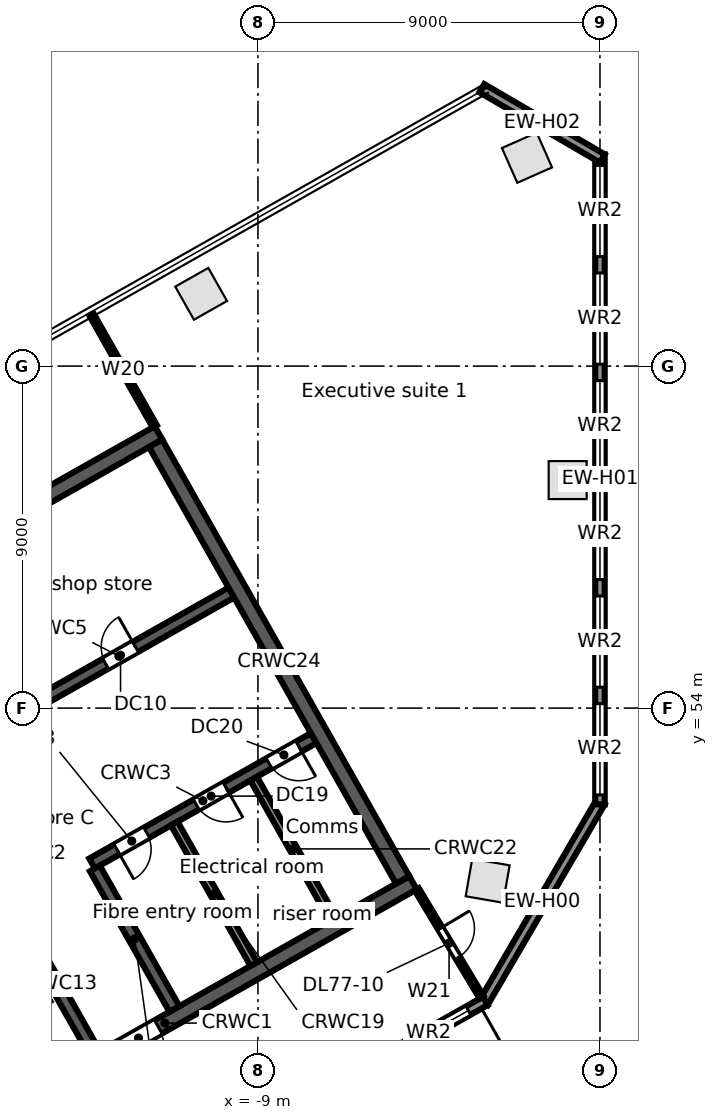
"""IFC4 building model, lengths in metres.
Left out: names, types, materials, properties, quantities, classifications, styles, units other than length and angle.
Written with IfcOpenShell. Run it as: python <this file> out.ifc"""

import sys

from ifc_helpers import new_model, si_unit, direction, frame, frame_2d, origin, origin_2d, place, context, subcontext, project, spatial, rectangle, extrude, element, fill, save


model = new_model("IFC4")
c1 = context("Model", 3, precision=1e-05, world=origin(), true_north=direction((0.0, 1.0)))
c2 = subcontext(c1, "Body", "Model", "MODEL_VIEW")
j1 = project(units=[si_unit("LENGTHUNIT", "METRE"), si_unit("PLANEANGLEUNIT", "RADIAN")], contexts=[c1])
p1 = place(None, origin())
s1 = spatial("IfcSite", under=j1, at=p1, CompositionType="ELEMENT")
p2 = place(p1, origin())
s2 = spatial("IfcBuilding", under=s1, at=p2, CompositionType="ELEMENT")
p3 = place(p2, frame((0.0, 0.0, 339.3)))
s3 = spatial("IfcBuildingStorey", under=s2, at=p3, CompositionType="ELEMENT", Elevation=339.3)
for number, where, z_axis, x_axis in (
    (1, (-10.495, 64.902, 0.0), (0.0, 0.0, 1.0), (-0.87, -0.492, 0.0)),
    (2, (-2.955, 49.456, 0.0), (0.0, 0.0, 1.0), (-0.985, 0.171, 0.0)),
    (3, (-0.85, 60.0, 0.0), (0.0, 0.0, 1.0), (0.0, 1.0, 0.0)),
    (4, (-1.92, 68.483, 0.0), (0.0, 0.0, 1.0), (-0.915, -0.404, 0.0)),
):
    element("IfcColumn", number, at=place(p3, frame(where, z_axis=z_axis, x_axis=x_axis)), inside=s3, PredefinedType="COLUMN", context=c2, shape_type="SweptSolid", body=[
        extrude(rectangle(XDim=1.0, YDim=1.0, at=origin_2d()), origin(), (0.0, 0.0, 1.0), 3.8),
    ])
p4 = place(p3, frame((0.017, 51.529, 0.0), z_axis=(0.0, 0.0, 1.0), x_axis=(-0.503769237131, -0.863838269424, 0.0)))
e5 = element("IfcWall", 5, at=p4, inside=s3, PredefinedType="STANDARD", context=c2, shape_type="SweptSolid", body=[
    extrude(rectangle(XDim=6.115, YDim=0.25, at=frame_2d((3.057, 0.0))), origin(), (0.0, 0.0, 1.0), 3.52),
])
p5 = place(p3, frame((0.0, 68.572, 0.0), z_axis=(0.0, 0.0, 1.0), x_axis=(0.0, -1.0, 0.0)))
e6 = element("IfcWall", 6, at=p5, inside=s3, PredefinedType="STANDARD", context=c2, shape_type="SweptSolid", body=[
    extrude(rectangle(XDim=17.105, YDim=0.25, at=frame_2d((8.553, 0.0))), origin(), (0.0, 0.0, 1.0), 3.52),
])
p6 = place(p5, frame((14.455, 0.0, 0.8)))
e7 = element("IfcOpeningElement", 7, at=p6, cuts=e6, PredefinedType="OPENING", context=c2, shape_type="SweptSolid", body=[
    extrude(rectangle(XDim=2.4, YDim=2.2, at=frame_2d((1.2, 1.1))), frame((0.0, 0.135, 0.0), z_axis=(0.0, -1.0, 0.0), x_axis=(1.0, 0.0, 0.0)), (0.0, 0.0, 1.0), 0.27),
])
p7 = place(p5, frame((11.622, 0.0, 0.8)))
e8 = element("IfcOpeningElement", 8, at=p7, cuts=e6, PredefinedType="OPENING", context=c2, shape_type="SweptSolid", body=[
    extrude(rectangle(XDim=2.4, YDim=2.2, at=frame_2d((1.2, 1.1))), frame((0.0, 0.135, 0.0), z_axis=(0.0, -1.0, 0.0), x_axis=(1.0, 0.0, 0.0)), (0.0, 0.0, 1.0), 0.27),
])
p8 = place(p5, frame((8.789, 0.0, 0.8)))
e9 = element("IfcOpeningElement", 9, at=p8, cuts=e6, PredefinedType="OPENING", context=c2, shape_type="SweptSolid", body=[
    extrude(rectangle(XDim=2.4, YDim=2.2, at=frame_2d((1.2, 1.1))), frame((0.0, 0.135, 0.0), z_axis=(0.0, -1.0, 0.0), x_axis=(1.0, 0.0, 0.0)), (0.0, 0.0, 1.0), 0.27),
])
p9 = place(p5, frame((5.955, 0.0, 0.8)))
e10 = element("IfcOpeningElement", 10, at=p9, cuts=e6, PredefinedType="OPENING", context=c2, shape_type="SweptSolid", body=[
    extrude(rectangle(XDim=2.4, YDim=2.2, at=frame_2d((1.2, 1.1))), frame((0.0, 0.135, 0.0), z_axis=(0.0, -1.0, 0.0), x_axis=(1.0, 0.0, 0.0)), (0.0, 0.0, 1.0), 0.27),
])
p10 = place(p5, frame((3.122, 0.0, 0.8)))
e11 = element("IfcOpeningElement", 11, at=p10, cuts=e6, PredefinedType="OPENING", context=c2, shape_type="SweptSolid", body=[
    extrude(rectangle(XDim=2.4, YDim=2.2, at=frame_2d((1.2, 1.1))), frame((0.0, 0.135, 0.0), z_axis=(0.0, -1.0, 0.0), x_axis=(1.0, 0.0, 0.0)), (0.0, 0.0, 1.0), 0.27),
])
p11 = place(p5, frame((0.289, 0.0, 0.8)))
e12 = element("IfcOpeningElement", 12, at=p11, cuts=e6, PredefinedType="OPENING", context=c2, shape_type="SweptSolid", body=[
    extrude(rectangle(XDim=2.4, YDim=2.2, at=frame_2d((1.2, 1.1))), frame((0.0, 0.135, 0.0), z_axis=(0.0, -1.0, 0.0), x_axis=(1.0, 0.0, 0.0)), (0.0, 0.0, 1.0), 0.27),
])
p12 = place(p3, frame((-3.108, 70.313, 0.0), z_axis=(0.0, 0.0, 1.0), x_axis=(0.86382474085, -0.503792434536, 0.0)))
e13 = element("IfcWall", 13, at=p12, inside=s3, PredefinedType="STANDARD", context=c2, shape_type="SweptSolid", body=[
    extrude(rectangle(XDim=3.67, YDim=0.25, at=frame_2d((1.835, 0.0))), origin(), (0.0, 0.0, 1.0), 3.52),
])
p13 = place(p3, frame((-3.017, 46.293, 0.0), z_axis=(0.0, 0.0, 1.0), x_axis=(-0.870355474887, -0.492423950812, 0.0)))
e14 = element("IfcWall", 14, at=p13, inside=s3, PredefinedType="STANDARD", context=c2, shape_type="SweptSolid", body=[
    extrude(rectangle(XDim=40.34, YDim=0.25, at=frame_2d((20.17, 0.0))), origin(), (0.0, 0.0, 1.0), 3.52),
])
p14 = place(p13, frame((37.428, 0.0, 0.8)))
e15 = element("IfcOpeningElement", 15, at=p14, cuts=e14, PredefinedType="OPENING", context=c2, shape_type="SweptSolid", body=[
    extrude(rectangle(XDim=2.4, YDim=2.2, at=frame_2d((1.2, 1.1))), frame((0.0, 0.135, 0.0), z_axis=(0.0, -1.0, 0.0), x_axis=(1.0, 0.0, 0.0)), (0.0, 0.0, 1.0), 0.27),
])
p15 = place(p13, frame((34.372, 0.0, 0.0)))
e16 = element("IfcOpeningElement", 16, at=p15, cuts=e14, PredefinedType="OPENING", context=c2, shape_type="SweptSolid", body=[
    extrude(rectangle(XDim=1.8, YDim=2.4, at=frame_2d((0.9, 1.2))), frame((0.0, 0.135, 0.0), z_axis=(0.0, -1.0, 0.0), x_axis=(1.0, 0.0, 0.0)), (0.0, 0.0, 1.0), 0.27),
])
p16 = place(p13, frame((30.716, 0.0, 0.8)))
e17 = element("IfcOpeningElement", 17, at=p16, cuts=e14, PredefinedType="OPENING", context=c2, shape_type="SweptSolid", body=[
    extrude(rectangle(XDim=2.4, YDim=2.2, at=frame_2d((1.2, 1.1))), frame((0.0, 0.135, 0.0), z_axis=(0.0, -1.0, 0.0), x_axis=(1.0, 0.0, 0.0)), (0.0, 0.0, 1.0), 0.27),
])
p17 = place(p13, frame((27.36, 0.0, 0.8)))
e18 = element("IfcOpeningElement", 18, at=p17, cuts=e14, PredefinedType="OPENING", context=c2, shape_type="SweptSolid", body=[
    extrude(rectangle(XDim=2.4, YDim=2.2, at=frame_2d((1.2, 1.1))), frame((0.0, 0.135, 0.0), z_axis=(0.0, -1.0, 0.0), x_axis=(1.0, 0.0, 0.0)), (0.0, 0.0, 1.0), 0.27),
])
p18 = place(p13, frame((24.304, 0.0, 0.0)))
e19 = element("IfcOpeningElement", 19, at=p18, cuts=e14, PredefinedType="OPENING", context=c2, shape_type="SweptSolid", body=[
    extrude(rectangle(XDim=1.8, YDim=2.4, at=frame_2d((0.9, 1.2))), frame((0.0, 0.135, 0.0), z_axis=(0.0, -1.0, 0.0), x_axis=(1.0, 0.0, 0.0)), (0.0, 0.0, 1.0), 0.27),
])
p19 = place(p13, frame((20.648, 0.0, 0.8)))
e20 = element("IfcOpeningElement", 20, at=p19, cuts=e14, PredefinedType="OPENING", context=c2, shape_type="SweptSolid", body=[
    extrude(rectangle(XDim=2.4, YDim=2.2, at=frame_2d((1.2, 1.1))), frame((0.0, 0.135, 0.0), z_axis=(0.0, -1.0, 0.0), x_axis=(1.0, 0.0, 0.0)), (0.0, 0.0, 1.0), 0.27),
])
p20 = place(p13, frame((17.292, 0.0, 0.8)))
e21 = element("IfcOpeningElement", 21, at=p20, cuts=e14, PredefinedType="OPENING", context=c2, shape_type="SweptSolid", body=[
    extrude(rectangle(XDim=2.4, YDim=2.2, at=frame_2d((1.2, 1.1))), frame((0.0, 0.135, 0.0), z_axis=(0.0, -1.0, 0.0), x_axis=(1.0, 0.0, 0.0)), (0.0, 0.0, 1.0), 0.27),
])
p21 = place(p13, frame((14.236, 0.0, 0.0)))
e22 = element("IfcOpeningElement", 22, at=p21, cuts=e14, PredefinedType="OPENING", context=c2, shape_type="SweptSolid", body=[
    extrude(rectangle(XDim=1.8, YDim=2.4, at=frame_2d((0.9, 1.2))), frame((0.0, 0.135, 0.0), z_axis=(0.0, -1.0, 0.0), x_axis=(1.0, 0.0, 0.0)), (0.0, 0.0, 1.0), 0.27),
])
p22 = place(p13, frame((10.58, 0.0, 0.8)))
e23 = element("IfcOpeningElement", 23, at=p22, cuts=e14, PredefinedType="OPENING", context=c2, shape_type="SweptSolid", body=[
    extrude(rectangle(XDim=2.4, YDim=2.2, at=frame_2d((1.2, 1.1))), frame((0.0, 0.135, 0.0), z_axis=(0.0, -1.0, 0.0), x_axis=(1.0, 0.0, 0.0)), (0.0, 0.0, 1.0), 0.27),
])
p23 = place(p13, frame((7.224, 0.0, 0.8)))
e24 = element("IfcOpeningElement", 24, at=p23, cuts=e14, PredefinedType="OPENING", context=c2, shape_type="SweptSolid", body=[
    extrude(rectangle(XDim=2.4, YDim=2.2, at=frame_2d((1.2, 1.1))), frame((0.0, 0.135, 0.0), z_axis=(0.0, -1.0, 0.0), x_axis=(1.0, 0.0, 0.0)), (0.0, 0.0, 1.0), 0.27),
])
p24 = place(p13, frame((4.168, 0.0, 0.0)))
e25 = element("IfcOpeningElement", 25, at=p24, cuts=e14, PredefinedType="OPENING", context=c2, shape_type="SweptSolid", body=[
    extrude(rectangle(XDim=1.8, YDim=2.4, at=frame_2d((0.9, 1.2))), frame((0.0, 0.135, 0.0), z_axis=(0.0, -1.0, 0.0), x_axis=(1.0, 0.0, 0.0)), (0.0, 0.0, 1.0), 0.27),
])
p25 = place(p13, frame((0.512, 0.0, 0.8)))
e26 = element("IfcOpeningElement", 26, at=p25, cuts=e14, PredefinedType="OPENING", context=c2, shape_type="SweptSolid", body=[
    extrude(rectangle(XDim=2.4, YDim=2.2, at=frame_2d((1.2, 1.1))), frame((0.0, 0.135, 0.0), z_axis=(0.0, -1.0, 0.0), x_axis=(1.0, 0.0, 0.0)), (0.0, 0.0, 1.0), 0.27),
])
p26 = place(p3, frame((-17.975, 42.017, 0.0), z_axis=(0.0, 0.0, 1.0), x_axis=(0.87034965173, 0.492434243055, 0.0)))
e27 = element("IfcWall", 27, at=p26, inside=s3, PredefinedType="SOLIDWALL", context=c2, shape_type="SweptSolid", body=[
    extrude(rectangle(XDim=15.0, YDim=0.4, at=frame_2d((7.5, 0.0))), origin(), (0.0, 0.0, 1.0), 3.52),
])
p27 = place(p26, frame((6.1, 0.0, 0.0)))
e28 = element("IfcOpeningElement", 28, at=p27, cuts=e27, PredefinedType="OPENING", context=c2, shape_type="SweptSolid", body=[
    extrude(rectangle(XDim=1.2, YDim=2.1, at=frame_2d((0.6, 1.05))), frame((0.0, 0.21, 0.0), z_axis=(0.0, -1.0, 0.0), x_axis=(1.0, 0.0, 0.0)), (0.0, 0.0, 1.0), 0.42),
])
p28 = place(p3, frame((-13.365, 49.911, 0.0), z_axis=(0.0, 0.0, 1.0), x_axis=(0.870347618718, 0.492437836272, 0.0)))
e29 = element("IfcWall", 29, at=p28, inside=s3, PredefinedType="SOLIDWALL", context=c2, shape_type="SweptSolid", body=[
    extrude(rectangle(XDim=6.7, YDim=0.3, at=frame_2d((3.35, 0.0))), origin(), (0.0, 0.0, 1.0), 3.52),
])
p29 = place(p28, frame((0.75, 0.0, 0.0)))
e30 = element("IfcOpeningElement", 30, at=p29, cuts=e29, PredefinedType="OPENING", context=c2, shape_type="SweptSolid", body=[
    extrude(rectangle(XDim=0.9, YDim=2.1, at=frame_2d((0.45, 1.05))), frame((0.0, 0.16, 0.0), z_axis=(0.0, -1.0, 0.0), x_axis=(1.0, 0.0, 0.0)), (0.0, 0.0, 1.0), 0.32),
])
p30 = place(p28, frame((3.15, 0.0, 0.0)))
e31 = element("IfcOpeningElement", 31, at=p30, cuts=e29, PredefinedType="OPENING", context=c2, shape_type="SweptSolid", body=[
    extrude(rectangle(XDim=0.9, YDim=2.1, at=frame_2d((0.45, 1.05))), frame((0.0, 0.16, 0.0), z_axis=(0.0, -1.0, 0.0), x_axis=(1.0, 0.0, 0.0)), (0.0, 0.0, 1.0), 0.32),
])
p31 = place(p28, frame((5.35, 0.0, 0.0)))
e32 = element("IfcOpeningElement", 32, at=p31, cuts=e29, PredefinedType="OPENING", context=c2, shape_type="SweptSolid", body=[
    extrude(rectangle(XDim=0.9, YDim=2.1, at=frame_2d((0.45, 1.05))), frame((0.0, 0.16, 0.0), z_axis=(0.0, -1.0, 0.0), x_axis=(1.0, 0.0, 0.0)), (0.0, 0.0, 1.0), 0.32),
])
p32 = place(p3, frame((-15.618, 53.691, 0.0), z_axis=(0.0, 0.0, 1.0), x_axis=(0.870362830851, 0.492410948978, 0.0)))
e33 = element("IfcWall", 33, at=p32, inside=s3, PredefinedType="SOLIDWALL", context=c2, shape_type="SweptSolid", body=[
    extrude(rectangle(XDim=6.8, YDim=0.3, at=frame_2d((3.4, 0.0))), origin(), (0.0, 0.0, 1.0), 3.52),
])
p33 = place(p32, frame((3.0, 0.0, 0.0)))
e34 = element("IfcOpeningElement", 34, at=p33, cuts=e33, PredefinedType="OPENING", context=c2, shape_type="SweptSolid", body=[
    extrude(rectangle(XDim=0.9, YDim=2.1, at=frame_2d((0.45, 1.05))), frame((0.0, 0.16, 0.0), z_axis=(0.0, -1.0, 0.0), x_axis=(1.0, 0.0, 0.0)), (0.0, 0.0, 1.0), 0.32),
])
p34 = place(p3, frame((-24.672, 53.854, 0.0), z_axis=(0.0, 0.0, 1.0), x_axis=(0.870353598469, 0.492427267353, 0.0)))
e35 = element("IfcWall", 35, at=p34, inside=s3, PredefinedType="SOLIDWALL", context=c2, shape_type="SweptSolid", body=[
    extrude(rectangle(XDim=15.0, YDim=0.4, at=frame_2d((7.5, 0.0))), origin(), (0.0, 0.0, 1.0), 3.52),
])
p35 = place(p3, frame((-15.379, 48.599, 0.0), z_axis=(0.0, 0.0, 1.0), x_axis=(0.492422543467, -0.870356271124, 0.0)))
e36 = element("IfcWall", 36, at=p35, inside=s3, PredefinedType="SOLIDWALL", context=c2, shape_type="SweptSolid", body=[
    extrude(rectangle(XDim=4.25, YDim=0.3, at=frame_2d((2.125, 0.0))), origin(), (0.0, 0.0, 1.0), 3.52),
])
p36 = place(p3, frame((-13.291, 49.781, 0.0), z_axis=(0.0, 0.0, 1.0), x_axis=(0.492397924348, -0.870370199454, 0.0)))
e37 = element("IfcWall", 37, at=p36, inside=s3, PredefinedType="SOLIDWALL", context=c2, shape_type="SweptSolid", body=[
    extrude(rectangle(XDim=4.25, YDim=0.3, at=frame_2d((2.125, 0.0))), origin(), (0.0, 0.0, 1.0), 3.52),
])
p37 = place(p3, frame((-11.202, 50.962, 0.0), z_axis=(0.0, 0.0, 1.0), x_axis=(0.492441437811, -0.870345580977, 0.0)))
e38 = element("IfcWall", 38, at=p37, inside=s3, PredefinedType="PARTITIONING", context=c2, shape_type="SweptSolid", body=[
    extrude(rectangle(XDim=4.25, YDim=0.2, at=frame_2d((2.125, 0.0))), origin(), (0.0, 0.0, 1.0), 3.52),
])
p38 = place(p3, frame((-9.113, 52.144, 0.0), z_axis=(0.0, 0.0, 1.0), x_axis=(0.492422543467, -0.870356271124, 0.0)))
e39 = element("IfcWall", 39, at=p38, inside=s3, PredefinedType="PARTITIONING", context=c2, shape_type="SweptSolid", body=[
    extrude(rectangle(XDim=4.25, YDim=0.2, at=frame_2d((2.125, 0.0))), origin(), (0.0, 0.0, 1.0), 3.52),
])
p39 = place(p3, frame((-11.692, 60.968, 0.0), z_axis=(0.0, 0.0, 1.0), x_axis=(0.492421663121, -0.870356769198, 0.0)))
e40 = element("IfcWall", 40, at=p39, inside=s3, PredefinedType="SOLIDWALL", context=c2, shape_type="SweptSolid", body=[
    extrude(rectangle(XDim=13.2, YDim=0.4, at=frame_2d((6.6, 0.0))), origin(), (0.0, 0.0, 1.0), 3.52),
])
p40 = place(p3, frame((-13.382, 64.36, 0.0), z_axis=(0.0, 0.0, 1.0), x_axis=(0.492468354667, -0.870330350874, 0.0)))
e41 = element("IfcWall", 41, at=p40, inside=s3, PredefinedType="PARTITIONING", context=c2, shape_type="SweptSolid", body=[
    extrude(rectangle(XDim=3.385, YDim=0.125, at=frame_2d((1.692, 0.0))), origin(), (0.0, 0.0, 1.0), 2.888),
])
p41 = place(p3, frame((-4.821, 49.23, 0.0), z_axis=(0.0, 0.0, 1.0), x_axis=(0.515006587647, -0.857186219371, 0.0)))
e42 = element("IfcWall", 42, at=p41, inside=s3, PredefinedType="PARTITIONING", context=c2, shape_type="SweptSolid", body=[
    extrude(rectangle(XDim=3.303, YDim=0.125, at=frame_2d((1.651, 0.0))), origin(), (0.0, 0.0, 1.0), 2.8),
])
p42 = place(p41, frame((1.2, 0.0, 0.0)))
e43 = element("IfcOpeningElement", 43, at=p42, cuts=e42, PredefinedType="OPENING", context=c2, shape_type="SweptSolid", body=[
    extrude(rectangle(XDim=0.9, YDim=2.1, at=frame_2d((0.45, 1.05))), frame((0.0, 0.073, 0.0), z_axis=(0.0, -1.0, 0.0), x_axis=(1.0, 0.0, 0.0)), (0.0, 0.0, 1.0), 0.145),
])
p43 = place(p6, origin())
e44 = element("IfcWindow", 44, at=p43, inside=s3, PartitioningType="SINGLE_PANEL", PredefinedType="WINDOW", context=c2, shape_type="SweptSolid", body=[
    extrude(rectangle(XDim=2.4, YDim=2.2, at=frame_2d((1.2, 1.1))), frame((0.0, 0.03, 0.0), z_axis=(0.0, -1.0, 0.0), x_axis=(1.0, 0.0, 0.0)), (0.0, 0.0, 1.0), 0.06),
])
fill(e7, e44)
p44 = place(p7, origin())
e45 = element("IfcWindow", 45, at=p44, inside=s3, PartitioningType="SINGLE_PANEL", PredefinedType="WINDOW", context=c2, shape_type="SweptSolid", body=[
    extrude(rectangle(XDim=2.4, YDim=2.2, at=frame_2d((1.2, 1.1))), frame((0.0, 0.03, 0.0), z_axis=(0.0, -1.0, 0.0), x_axis=(1.0, 0.0, 0.0)), (0.0, 0.0, 1.0), 0.06),
])
fill(e8, e45)
p45 = place(p8, origin())
e46 = element("IfcWindow", 46, at=p45, inside=s3, PartitioningType="SINGLE_PANEL", PredefinedType="WINDOW", context=c2, shape_type="SweptSolid", body=[
    extrude(rectangle(XDim=2.4, YDim=2.2, at=frame_2d((1.2, 1.1))), frame((0.0, 0.03, 0.0), z_axis=(0.0, -1.0, 0.0), x_axis=(1.0, 0.0, 0.0)), (0.0, 0.0, 1.0), 0.06),
])
fill(e9, e46)
p46 = place(p9, origin())
e47 = element("IfcWindow", 47, at=p46, inside=s3, PartitioningType="SINGLE_PANEL", PredefinedType="WINDOW", context=c2, shape_type="SweptSolid", body=[
    extrude(rectangle(XDim=2.4, YDim=2.2, at=frame_2d((1.2, 1.1))), frame((0.0, 0.03, 0.0), z_axis=(0.0, -1.0, 0.0), x_axis=(1.0, 0.0, 0.0)), (0.0, 0.0, 1.0), 0.06),
])
fill(e10, e47)
p47 = place(p10, origin())
e48 = element("IfcWindow", 48, at=p47, inside=s3, PartitioningType="SINGLE_PANEL", PredefinedType="WINDOW", context=c2, shape_type="SweptSolid", body=[
    extrude(rectangle(XDim=2.4, YDim=2.2, at=frame_2d((1.2, 1.1))), frame((0.0, 0.03, 0.0), z_axis=(0.0, -1.0, 0.0), x_axis=(1.0, 0.0, 0.0)), (0.0, 0.0, 1.0), 0.06),
])
fill(e11, e48)
p48 = place(p11, origin())
e49 = element("IfcWindow", 49, at=p48, inside=s3, PartitioningType="SINGLE_PANEL", PredefinedType="WINDOW", context=c2, shape_type="SweptSolid", body=[
    extrude(rectangle(XDim=2.4, YDim=2.2, at=frame_2d((1.2, 1.1))), frame((0.0, 0.03, 0.0), z_axis=(0.0, -1.0, 0.0), x_axis=(1.0, 0.0, 0.0)), (0.0, 0.0, 1.0), 0.06),
])
fill(e12, e49)
p49 = place(p25, origin())
e50 = element("IfcWindow", 50, at=p49, inside=s3, PartitioningType="SINGLE_PANEL", PredefinedType="WINDOW", context=c2, shape_type="SweptSolid", body=[
    extrude(rectangle(XDim=2.4, YDim=2.2, at=frame_2d((1.2, 1.1))), frame((0.0, 0.03, 0.0), z_axis=(0.0, -1.0, 0.0), x_axis=(1.0, 0.0, 0.0)), (0.0, 0.0, 1.0), 0.06),
])
fill(e26, e50)
p50 = place(p27, frame((1.2, 0.0, 0.0), z_axis=(0.0, 0.0, 1.0), x_axis=(-1.0, 0.0, 0.0)))
e51 = element("IfcDoor", 51, at=p50, inside=s3, OperationType="SINGLE_SWING_RIGHT", PredefinedType="DOOR", context=c2, shape_type="SweptSolid", body=[
    extrude(rectangle(XDim=1.2, YDim=2.1, at=frame_2d((0.6, 1.05))), frame((0.0, 0.025, 0.0), z_axis=(0.0, -1.0, 0.0), x_axis=(1.0, 0.0, 0.0)), (0.0, 0.0, 1.0), 0.05),
])
fill(e28, e51)
p51 = place(p33, origin())
e52 = element("IfcDoor", 52, at=p51, inside=s3, OperationType="SINGLE_SWING_RIGHT", PredefinedType="DOOR", context=c2, shape_type="SweptSolid", body=[
    extrude(rectangle(XDim=0.9, YDim=2.1, at=frame_2d((0.45, 1.05))), frame((0.0, 0.025, 0.0), z_axis=(0.0, -1.0, 0.0), x_axis=(1.0, 0.0, 0.0)), (0.0, 0.0, 1.0), 0.05),
])
fill(e34, e52)
p52 = place(p29, frame((0.9, 0.0, 0.0), z_axis=(0.0, 0.0, 1.0), x_axis=(-1.0, 0.0, 0.0)))
e53 = element("IfcDoor", 53, at=p52, inside=s3, OperationType="SINGLE_SWING_RIGHT", PredefinedType="DOOR", context=c2, shape_type="SweptSolid", body=[
    extrude(rectangle(XDim=0.9, YDim=2.1, at=frame_2d((0.45, 1.05))), frame((0.0, 0.025, 0.0), z_axis=(0.0, -1.0, 0.0), x_axis=(1.0, 0.0, 0.0)), (0.0, 0.0, 1.0), 0.05),
])
fill(e30, e53)
p53 = place(p30, frame((0.9, 0.0, 0.0), z_axis=(0.0, 0.0, 1.0), x_axis=(-1.0, 0.0, 0.0)))
e54 = element("IfcDoor", 54, at=p53, inside=s3, OperationType="SINGLE_SWING_LEFT", PredefinedType="DOOR", context=c2, shape_type="SweptSolid", body=[
    extrude(rectangle(XDim=0.9, YDim=2.1, at=frame_2d((0.45, 1.05))), frame((0.0, 0.025, 0.0), z_axis=(0.0, -1.0, 0.0), x_axis=(1.0, 0.0, 0.0)), (0.0, 0.0, 1.0), 0.05),
])
fill(e31, e54)
p54 = place(p31, frame((0.9, 0.0, 0.0), z_axis=(0.0, 0.0, 1.0), x_axis=(-1.0, 0.0, 0.0)))
e55 = element("IfcDoor", 55, at=p54, inside=s3, OperationType="SINGLE_SWING_LEFT", PredefinedType="DOOR", context=c2, shape_type="SweptSolid", body=[
    extrude(rectangle(XDim=0.9, YDim=2.1, at=frame_2d((0.45, 1.05))), frame((0.0, 0.025, 0.0), z_axis=(0.0, -1.0, 0.0), x_axis=(1.0, 0.0, 0.0)), (0.0, 0.0, 1.0), 0.05),
])
fill(e32, e55)
p55 = place(p42, origin())
e56 = element("IfcDoor", 56, at=p55, inside=s3, OperationType="SINGLE_SWING_LEFT", PredefinedType="DOOR", context=c2, shape_type="SweptSolid", body=[
    extrude(rectangle(XDim=0.9, YDim=2.1, at=frame_2d((0.45, 1.05))), frame((0.0, 0.025, 0.0), z_axis=(0.0, -1.0, 0.0), x_axis=(1.0, 0.0, 0.0)), (0.0, 0.0, 1.0), 0.05),
])
fill(e43, e56)
save(model, sys.argv[1])
